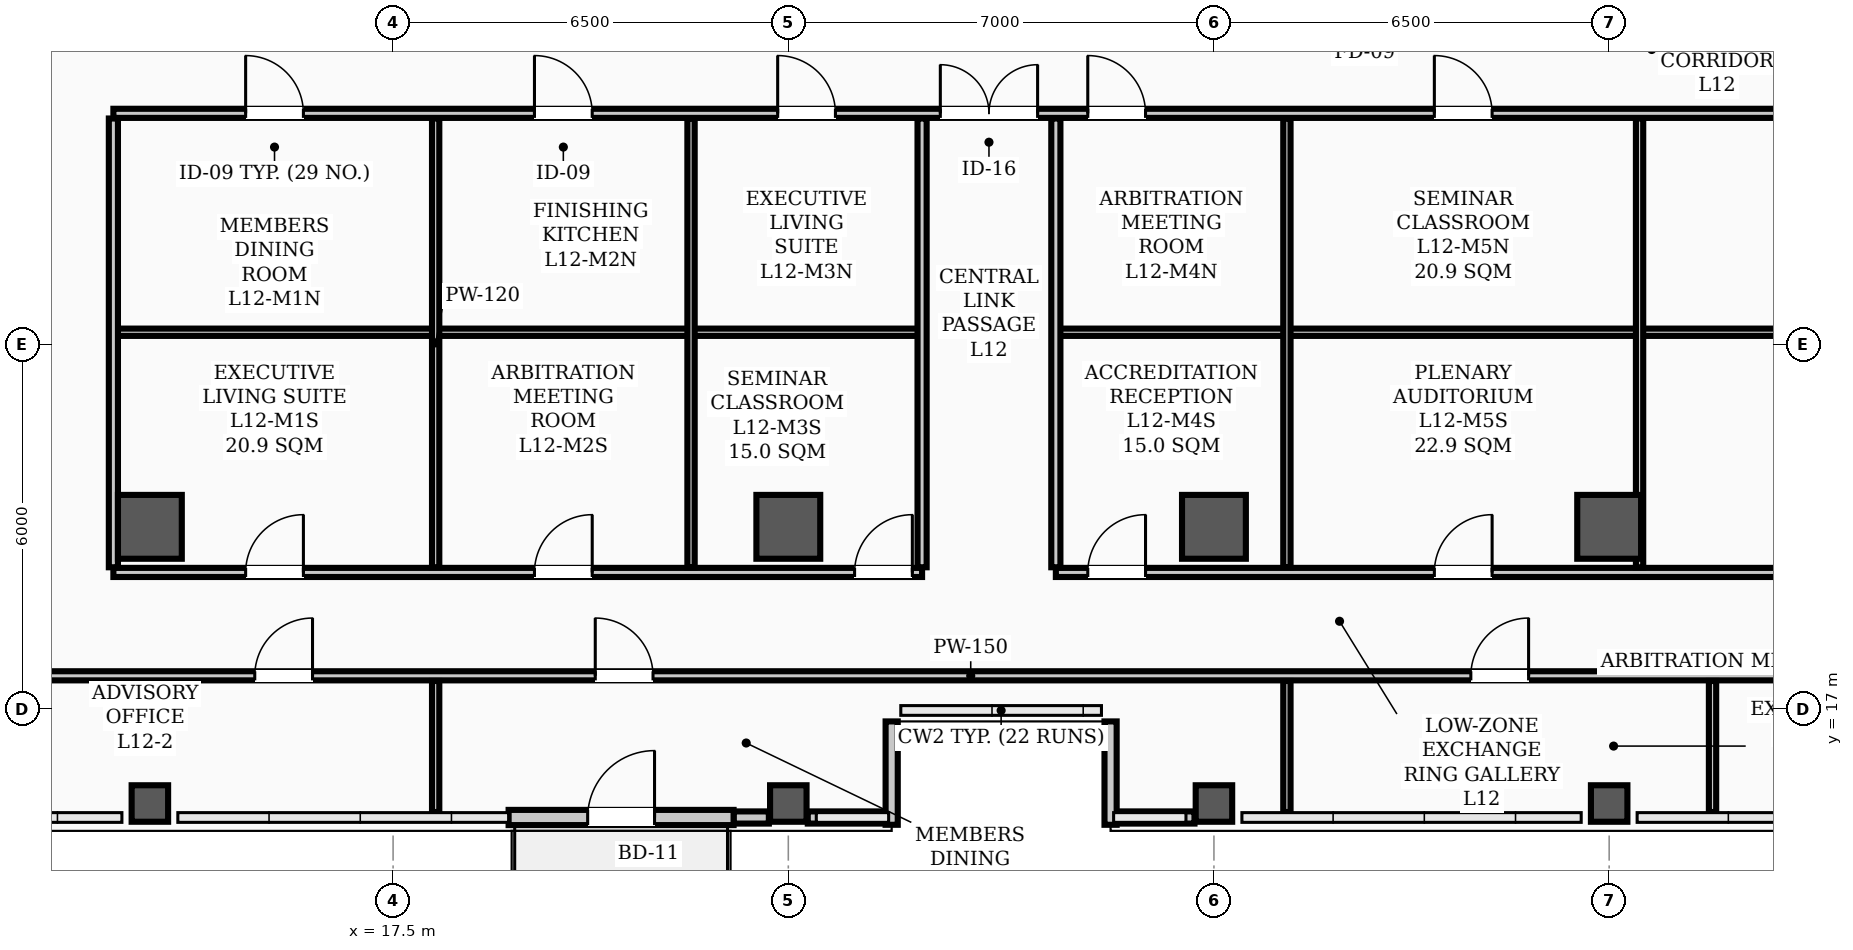
"""IFC4 building model, lengths in metres.
Left out: names, types, materials, properties, quantities, classifications, styles, units other than length and angle.
Written with IfcOpenShell. Run it as: python <this file> out.ifc"""

import sys

from ifc_helpers import new_model, si_unit, direction, frame, frame_2d, origin, origin_2d, place, context, subcontext, project, spatial, rectangle, hollow_rectangle, extrude, element, fill, save


model = new_model("IFC4")
c1 = context("Model", 3, precision=1e-05, world=origin(), true_north=direction((0.0, 1.0)))
c2 = subcontext(c1, "Body", "Model", "MODEL_VIEW")
j1 = project(units=[si_unit("LENGTHUNIT", "METRE"), si_unit("PLANEANGLEUNIT", "RADIAN")], contexts=[c1])
p1 = place(None, origin())
s1 = spatial("IfcSite", under=j1, at=p1, CompositionType="ELEMENT")
p2 = place(p1, origin())
s2 = spatial("IfcBuilding", under=s1, at=p2, CompositionType="ELEMENT")
p3 = place(p2, frame((0.0, 0.0, 49.9)))
s3 = spatial("IfcBuildingStorey", under=s2, at=p3, CompositionType="ELEMENT", Elevation=49.9)
for number, where, z_axis, x_axis in (
    (1, (13.5, 20.0, 0.0), (0.0, 0.0, 1.0), (1.0, 0.0, 0.0)),
    (2, (24.0, 20.0, 0.0), (0.0, 0.0, 1.0), (1.0, 0.0, 0.0)),
    (3, (31.0, 20.0, 0.0), (0.0, 0.0, 1.0), (1.0, 0.0, 0.0)),
    (4, (37.5, 20.0, 0.0), (0.0, 0.0, 1.0), (1.0, 0.0, 0.0)),
):
    element("IfcColumn", number, at=place(p3, frame(where, z_axis=z_axis, x_axis=x_axis)), inside=s3, PredefinedType="COLUMN", context=c2, shape_type="SweptSolid", body=[
        extrude(hollow_rectangle(XDim=1.05, YDim=1.05, WallThickness=0.038, InnerFilletRadius=0.019, OuterFilletRadius=0.057, at=origin_2d()), origin(), (0.0, 0.0, 1.0), 3.9),
    ])
for number, where, z_axis, x_axis in (
    (5, (13.5, 15.45, 0.0), (0.0, 0.0, 1.0), (1.0, 0.0, 0.0)),
    (6, (24.0, 15.45, 0.0), (0.0, 0.0, 1.0), (1.0, 0.0, 0.0)),
    (7, (31.0, 15.45, 0.0), (0.0, 0.0, 1.0), (1.0, 0.0, 0.0)),
    (8, (37.5, 15.45, 0.0), (0.0, 0.0, 1.0), (1.0, 0.0, 0.0)),
):
    element("IfcColumn", number, at=place(p3, frame(where, z_axis=z_axis, x_axis=x_axis)), inside=s3, PredefinedType="COLUMN", context=c2, shape_type="SweptSolid", body=[
        extrude(hollow_rectangle(XDim=0.6, YDim=0.6, WallThickness=0.026, InnerFilletRadius=0.013, OuterFilletRadius=0.039, at=origin_2d()), origin(), (0.0, 0.0, 1.0), 3.9),
    ])
p4 = place(p3, frame((23.1, 15.22, 0.0), z_axis=(0.0, 0.0, 1.0), x_axis=(1.0, 0.0, 0.0)))
e9 = element("IfcWall", 9, at=p4, inside=s3, PredefinedType="PARAPET", context=c2, shape_type="SweptSolid", body=[
    extrude(rectangle(XDim=0.58, YDim=0.2, at=frame_2d((0.29, 0.0))), origin(), (0.0, 0.0, 1.0), 1.2),
])
for number, where, z_axis, x_axis in (
    (10, (24.32, 15.22, 0.0), (0.0, 0.0, 1.0), (1.0, 0.0, 0.0)),
    (11, (29.35, 15.22, 0.0), (0.0, 0.0, 1.0), (1.0, 0.0, 0.0)),
):
    element("IfcWall", number, at=place(p3, frame(where, z_axis=z_axis, x_axis=x_axis)), inside=s3, PredefinedType="PARAPET", context=c2, shape_type="SweptSolid", body=[
        extrude(rectangle(XDim=1.33, YDim=0.2, at=frame_2d((0.665, 0.0))), origin(), (0.0, 0.0, 1.0), 1.2),
    ])
for number, where, z_axis, x_axis in (
    (12, (25.7, 15.1, 0.0), (0.0, 0.0, 1.0), (0.0, 1.0, 0.0)),
    (13, (29.3, 16.8, 0.0), (0.0, 0.0, 1.0), (0.0, -1.0, 0.0)),
):
    element("IfcWall", number, at=place(p3, frame(where, z_axis=z_axis, x_axis=x_axis)), inside=s3, PredefinedType="PARAPET", context=c2, shape_type="SweptSolid", body=[
        extrude(rectangle(XDim=1.7, YDim=0.2, at=frame_2d((0.85, 0.0))), origin(), (0.0, 0.0, 1.0), 1.2),
    ])
p5 = place(p3, frame((19.4, 15.22, 0.0), z_axis=(0.0, 0.0, 1.0), x_axis=(1.0, 0.0, 0.0)))
e14 = element("IfcWall", 14, at=p5, inside=s3, PredefinedType="STANDARD", context=c2, shape_type="SweptSolid", body=[
    extrude(rectangle(XDim=3.7, YDim=0.25, at=frame_2d((1.85, 0.0))), origin(), (0.0, 0.0, 1.0), 2.22),
])
p6 = place(p5, frame((1.3, 0.0, 0.0)))
e15 = element("IfcOpeningElement", 15, at=p6, cuts=e14, PredefinedType="OPENING", context=c2, shape_type="SweptSolid", body=[
    extrude(rectangle(XDim=1.1, YDim=2.2, at=frame_2d((0.55, 1.1))), frame((0.0, 0.135, 0.0), z_axis=(0.0, -1.0, 0.0), x_axis=(1.0, 0.0, 0.0)), (0.0, 0.0, 1.0), 0.27),
])
p7 = place(p3, frame((12.9, 26.8, 0.0), z_axis=(0.0, 0.0, 1.0), x_axis=(1.0, 0.0, 0.0)))
e16 = element("IfcWall", 16, at=p7, inside=s3, PredefinedType="PARTITIONING", context=c2, shape_type="SweptSolid", body=[
    extrude(rectangle(XDim=31.7, YDim=0.15, at=frame_2d((15.85, 0.0))), origin(), (0.0, 0.0, 1.0), 2.24),
])
p8 = place(p7, frame((13.6, 0.0, 0.0)))
e17 = element("IfcOpeningElement", 17, at=p8, cuts=e16, PredefinedType="OPENING", context=c2, shape_type="SweptSolid", body=[
    extrude(rectangle(XDim=1.6, YDim=2.08, at=frame_2d((0.8, 1.04))), frame((0.0, 0.085, 0.0), z_axis=(0.0, -1.0, 0.0), x_axis=(1.0, 0.0, 0.0)), (0.0, 0.0, 1.0), 0.17),
])
p9 = place(p7, frame((2.175, 0.0, 0.0)))
e18 = element("IfcOpeningElement", 18, at=p9, cuts=e16, PredefinedType="OPENING", context=c2, shape_type="SweptSolid", body=[
    extrude(rectangle(XDim=0.95, YDim=2.08, at=frame_2d((0.475, 1.04))), frame((0.0, 0.085, 0.0), z_axis=(0.0, -1.0, 0.0), x_axis=(1.0, 0.0, 0.0)), (0.0, 0.0, 1.0), 0.17),
])
p10 = place(p7, frame((6.925, 0.0, 0.0)))
e19 = element("IfcOpeningElement", 19, at=p10, cuts=e16, PredefinedType="OPENING", context=c2, shape_type="SweptSolid", body=[
    extrude(rectangle(XDim=0.95, YDim=2.08, at=frame_2d((0.475, 1.04))), frame((0.0, 0.085, 0.0), z_axis=(0.0, -1.0, 0.0), x_axis=(1.0, 0.0, 0.0)), (0.0, 0.0, 1.0), 0.17),
])
p11 = place(p7, frame((10.925, 0.0, 0.0)))
e20 = element("IfcOpeningElement", 20, at=p11, cuts=e16, PredefinedType="OPENING", context=c2, shape_type="SweptSolid", body=[
    extrude(rectangle(XDim=0.95, YDim=2.08, at=frame_2d((0.475, 1.04))), frame((0.0, 0.085, 0.0), z_axis=(0.0, -1.0, 0.0), x_axis=(1.0, 0.0, 0.0)), (0.0, 0.0, 1.0), 0.17),
])
p12 = place(p7, frame((16.025, 0.0, 0.0)))
e21 = element("IfcOpeningElement", 21, at=p12, cuts=e16, PredefinedType="OPENING", context=c2, shape_type="SweptSolid", body=[
    extrude(rectangle(XDim=0.95, YDim=2.08, at=frame_2d((0.475, 1.04))), frame((0.0, 0.085, 0.0), z_axis=(0.0, -1.0, 0.0), x_axis=(1.0, 0.0, 0.0)), (0.0, 0.0, 1.0), 0.17),
])
p13 = place(p7, frame((21.725, 0.0, 0.0)))
e22 = element("IfcOpeningElement", 22, at=p13, cuts=e16, PredefinedType="OPENING", context=c2, shape_type="SweptSolid", body=[
    extrude(rectangle(XDim=0.95, YDim=2.08, at=frame_2d((0.475, 1.04))), frame((0.0, 0.085, 0.0), z_axis=(0.0, -1.0, 0.0), x_axis=(1.0, 0.0, 0.0)), (0.0, 0.0, 1.0), 0.17),
])
p14 = place(p7, frame((27.925, 0.0, 0.0)))
e23 = element("IfcOpeningElement", 23, at=p14, cuts=e16, PredefinedType="OPENING", context=c2, shape_type="SweptSolid", body=[
    extrude(rectangle(XDim=0.95, YDim=2.08, at=frame_2d((0.475, 1.04))), frame((0.0, 0.085, 0.0), z_axis=(0.0, -1.0, 0.0), x_axis=(1.0, 0.0, 0.0)), (0.0, 0.0, 1.0), 0.17),
])
p15 = place(p3, frame((4.66, 17.55, 0.0), z_axis=(0.0, 0.0, 1.0), x_axis=(1.0, 0.0, 0.0)))
e24 = element("IfcWall", 24, at=p15, inside=s3, PredefinedType="PARTITIONING", context=c2, shape_type="SweptSolid", body=[
    extrude(rectangle(XDim=44.68, YDim=0.15, at=frame_2d((22.34, 0.0))), origin(), (0.0, 0.0, 1.0), 2.24),
])
p16 = place(p15, frame((10.565, 0.0, 0.0)))
e25 = element("IfcOpeningElement", 25, at=p16, cuts=e24, PredefinedType="OPENING", context=c2, shape_type="SweptSolid", body=[
    extrude(rectangle(XDim=0.95, YDim=2.08, at=frame_2d((0.475, 1.04))), frame((0.0, 0.085, 0.0), z_axis=(0.0, -1.0, 0.0), x_axis=(1.0, 0.0, 0.0)), (0.0, 0.0, 1.0), 0.17),
])
p17 = place(p15, frame((16.165, 0.0, 0.0)))
e26 = element("IfcOpeningElement", 26, at=p17, cuts=e24, PredefinedType="OPENING", context=c2, shape_type="SweptSolid", body=[
    extrude(rectangle(XDim=0.95, YDim=2.08, at=frame_2d((0.475, 1.04))), frame((0.0, 0.085, 0.0), z_axis=(0.0, -1.0, 0.0), x_axis=(1.0, 0.0, 0.0)), (0.0, 0.0, 1.0), 0.17),
])
p18 = place(p15, frame((30.565, 0.0, 0.0)))
e27 = element("IfcOpeningElement", 27, at=p18, cuts=e24, PredefinedType="OPENING", context=c2, shape_type="SweptSolid", body=[
    extrude(rectangle(XDim=0.95, YDim=2.08, at=frame_2d((0.475, 1.04))), frame((0.0, 0.085, 0.0), z_axis=(0.0, -1.0, 0.0), x_axis=(1.0, 0.0, 0.0)), (0.0, 0.0, 1.0), 0.17),
])
p19 = place(p15, frame((37.365, 0.0, 0.0)))
e28 = element("IfcOpeningElement", 28, at=p19, cuts=e24, PredefinedType="OPENING", context=c2, shape_type="SweptSolid", body=[
    extrude(rectangle(XDim=0.95, YDim=2.08, at=frame_2d((0.475, 1.04))), frame((0.0, 0.085, 0.0), z_axis=(0.0, -1.0, 0.0), x_axis=(1.0, 0.0, 0.0)), (0.0, 0.0, 1.0), 0.17),
])
p20 = place(p3, frame((12.9, 19.25, 0.0), z_axis=(0.0, 0.0, 1.0), x_axis=(1.0, 0.0, 0.0)))
e29 = element("IfcWall", 29, at=p20, inside=s3, PredefinedType="PARTITIONING", context=c2, shape_type="SweptSolid", body=[
    extrude(rectangle(XDim=13.3, YDim=0.15, at=frame_2d((6.65, 0.0))), origin(), (0.0, 0.0, 1.0), 2.24),
])
p21 = place(p20, frame((2.175, 0.0, 0.0)))
e30 = element("IfcOpeningElement", 30, at=p21, cuts=e29, PredefinedType="OPENING", context=c2, shape_type="SweptSolid", body=[
    extrude(rectangle(XDim=0.95, YDim=2.08, at=frame_2d((0.475, 1.04))), frame((0.0, 0.085, 0.0), z_axis=(0.0, -1.0, 0.0), x_axis=(1.0, 0.0, 0.0)), (0.0, 0.0, 1.0), 0.17),
])
p22 = place(p20, frame((6.925, 0.0, 0.0)))
e31 = element("IfcOpeningElement", 31, at=p22, cuts=e29, PredefinedType="OPENING", context=c2, shape_type="SweptSolid", body=[
    extrude(rectangle(XDim=0.95, YDim=2.08, at=frame_2d((0.475, 1.04))), frame((0.0, 0.085, 0.0), z_axis=(0.0, -1.0, 0.0), x_axis=(1.0, 0.0, 0.0)), (0.0, 0.0, 1.0), 0.17),
])
p23 = place(p20, frame((12.19, 0.0, 0.0)))
e32 = element("IfcOpeningElement", 32, at=p23, cuts=e29, PredefinedType="OPENING", context=c2, shape_type="SweptSolid", body=[
    extrude(rectangle(XDim=0.95, YDim=2.08, at=frame_2d((0.475, 1.04))), frame((0.0, 0.085, 0.0), z_axis=(0.0, -1.0, 0.0), x_axis=(1.0, 0.0, 0.0)), (0.0, 0.0, 1.0), 0.17),
])
p24 = place(p3, frame((28.4, 19.25, 0.0), z_axis=(0.0, 0.0, 1.0), x_axis=(1.0, 0.0, 0.0)))
e33 = element("IfcWall", 33, at=p24, inside=s3, PredefinedType="PARTITIONING", context=c2, shape_type="SweptSolid", body=[
    extrude(rectangle(XDim=16.2, YDim=0.15, at=frame_2d((8.1, 0.0))), origin(), (0.0, 0.0, 1.0), 2.24),
])
p25 = place(p24, frame((0.525, 0.0, 0.0)))
e34 = element("IfcOpeningElement", 34, at=p25, cuts=e33, PredefinedType="OPENING", context=c2, shape_type="SweptSolid", body=[
    extrude(rectangle(XDim=0.95, YDim=2.08, at=frame_2d((0.475, 1.04))), frame((0.0, 0.085, 0.0), z_axis=(0.0, -1.0, 0.0), x_axis=(1.0, 0.0, 0.0)), (0.0, 0.0, 1.0), 0.17),
])
p26 = place(p24, frame((6.225, 0.0, 0.0)))
e35 = element("IfcOpeningElement", 35, at=p26, cuts=e33, PredefinedType="OPENING", context=c2, shape_type="SweptSolid", body=[
    extrude(rectangle(XDim=0.95, YDim=2.08, at=frame_2d((0.475, 1.04))), frame((0.0, 0.085, 0.0), z_axis=(0.0, -1.0, 0.0), x_axis=(1.0, 0.0, 0.0)), (0.0, 0.0, 1.0), 0.17),
])
p27 = place(p24, frame((12.425, 0.0, 0.0)))
e36 = element("IfcOpeningElement", 36, at=p27, cuts=e33, PredefinedType="OPENING", context=c2, shape_type="SweptSolid", body=[
    extrude(rectangle(XDim=0.95, YDim=2.08, at=frame_2d((0.475, 1.04))), frame((0.0, 0.085, 0.0), z_axis=(0.0, -1.0, 0.0), x_axis=(1.0, 0.0, 0.0)), (0.0, 0.0, 1.0), 0.17),
])
p28 = place(p3, frame((12.9, 23.2, 0.0), z_axis=(0.0, 0.0, 1.0), x_axis=(1.0, 0.0, 0.0)))
e37 = element("IfcWall", 37, at=p28, inside=s3, PredefinedType="PARTITIONING", context=c2, shape_type="SweptSolid", body=[
    extrude(rectangle(XDim=5.3, YDim=0.12, at=frame_2d((2.65, 0.0))), origin(), (0.0, 0.0, 1.0), 2.24),
])
p29 = place(p3, frame((18.2, 23.2, 0.0), z_axis=(0.0, 0.0, 1.0), x_axis=(1.0, 0.0, 0.0)))
e38 = element("IfcWall", 38, at=p29, inside=s3, PredefinedType="PARTITIONING", context=c2, shape_type="SweptSolid", body=[
    extrude(rectangle(XDim=4.2, YDim=0.12, at=frame_2d((2.1, 0.0))), origin(), (0.0, 0.0, 1.0), 3.24),
])
for number, where, z_axis, x_axis in (
    (39, (22.4, 23.2, 0.0), (0.0, 0.0, 1.0), (1.0, 0.0, 0.0)),
    (40, (28.4, 23.2, 0.0), (0.0, 0.0, 1.0), (1.0, 0.0, 0.0)),
):
    element("IfcWall", number, at=place(p3, frame(where, z_axis=z_axis, x_axis=x_axis)), inside=s3, PredefinedType="PARTITIONING", context=c2, shape_type="SweptSolid", body=[
        extrude(rectangle(XDim=3.8, YDim=0.12, at=frame_2d((1.9, 0.0))), origin(), (0.0, 0.0, 1.0), 2.24),
    ])
p30 = place(p3, frame((32.2, 23.2, 0.0), z_axis=(0.0, 0.0, 1.0), x_axis=(1.0, 0.0, 0.0)))
e41 = element("IfcWall", 41, at=p30, inside=s3, PredefinedType="PARTITIONING", context=c2, shape_type="SweptSolid", body=[
    extrude(rectangle(XDim=5.8, YDim=0.12, at=frame_2d((2.9, 0.0))), origin(), (0.0, 0.0, 1.0), 2.24),
])
p31 = place(p3, frame((38.0, 23.2, 0.0), z_axis=(0.0, 0.0, 1.0), x_axis=(1.0, 0.0, 0.0)))
e42 = element("IfcWall", 42, at=p31, inside=s3, PredefinedType="PARTITIONING", context=c2, shape_type="SweptSolid", body=[
    extrude(rectangle(XDim=6.6, YDim=0.12, at=frame_2d((3.3, 0.0))), origin(), (0.0, 0.0, 1.0), 2.24),
])
for number, where, z_axis, x_axis in (
    (43, (26.2, 19.335, 0.0), (0.0, 0.0, 1.0), (0.0, 1.0, 0.0)),
    (44, (28.4, 19.335, 0.0), (0.0, 0.0, 1.0), (0.0, 1.0, 0.0)),
    (45, (12.9, 19.335, 0.0), (0.0, 0.0, 1.0), (0.0, 1.0, 0.0)),
):
    element("IfcWall", number, at=place(p3, frame(where, z_axis=z_axis, x_axis=x_axis)), inside=s3, PredefinedType="PARTITIONING", context=c2, shape_type="SweptSolid", body=[
        extrude(rectangle(XDim=7.38, YDim=0.15, at=frame_2d((3.69, 0.0))), origin(), (0.0, 0.0, 1.0), 2.24),
    ])
for number, where, z_axis, x_axis in (
    (46, (18.2, 15.31, 0.0), (0.0, 0.0, 1.0), (0.0, 1.0, 0.0)),
    (47, (32.2, 15.31, 0.0), (0.0, 0.0, 1.0), (0.0, 1.0, 0.0)),
    (48, (39.2, 15.31, 0.0), (0.0, 0.0, 1.0), (0.0, 1.0, 0.0)),
):
    element("IfcWall", number, at=place(p3, frame(where, z_axis=z_axis, x_axis=x_axis)), inside=s3, PredefinedType="PARTITIONING", context=c2, shape_type="SweptSolid", body=[
        extrude(rectangle(XDim=2.155, YDim=0.12, at=frame_2d((1.078, 0.0))), origin(), (0.0, 0.0, 1.0), 2.24),
    ])
for number, where, z_axis, x_axis in (
    (49, (18.2, 19.335, 0.0), (0.0, 0.0, 1.0), (0.0, 1.0, 0.0)),
    (50, (22.4, 19.335, 0.0), (0.0, 0.0, 1.0), (0.0, 1.0, 0.0)),
    (51, (32.2, 19.335, 0.0), (0.0, 0.0, 1.0), (0.0, 1.0, 0.0)),
    (52, (38.0, 19.335, 0.0), (0.0, 0.0, 1.0), (0.0, 1.0, 0.0)),
):
    element("IfcWall", number, at=place(p3, frame(where, z_axis=z_axis, x_axis=x_axis)), inside=s3, PredefinedType="PARTITIONING", context=c2, shape_type="SweptSolid", body=[
        extrude(rectangle(XDim=7.38, YDim=0.12, at=frame_2d((3.69, 0.0))), origin(), (0.0, 0.0, 1.0), 2.24),
    ])
p32 = place(p6, origin())
e53 = element("IfcDoor", 53, at=p32, inside=s3, OperationType="SINGLE_SWING_RIGHT", PredefinedType="DOOR", context=c2, shape_type="SweptSolid", body=[
    extrude(rectangle(XDim=1.1, YDim=2.2, at=frame_2d((0.55, 1.1))), frame((0.0, 0.025, 0.0), z_axis=(0.0, -1.0, 0.0), x_axis=(1.0, 0.0, 0.0)), (0.0, 0.0, 1.0), 0.05),
])
fill(e15, e53)
p33 = place(p8, origin())
e54 = element("IfcDoor", 54, at=p33, inside=s3, OperationType="DOUBLE_DOOR_SINGLE_SWING", PredefinedType="DOOR", context=c2, shape_type="SweptSolid", body=[
    extrude(rectangle(XDim=1.6, YDim=2.08, at=frame_2d((0.8, 1.04))), frame((0.0, 0.025, 0.0), z_axis=(0.0, -1.0, 0.0), x_axis=(1.0, 0.0, 0.0)), (0.0, 0.0, 1.0), 0.05),
])
fill(e17, e54)
p34 = place(p16, origin())
e55 = element("IfcDoor", 55, at=p34, inside=s3, OperationType="SINGLE_SWING_RIGHT", PredefinedType="DOOR", context=c2, shape_type="SweptSolid", body=[
    extrude(rectangle(XDim=0.95, YDim=2.08, at=frame_2d((0.475, 1.04))), frame((0.0, 0.025, 0.0), z_axis=(0.0, -1.0, 0.0), x_axis=(1.0, 0.0, 0.0)), (0.0, 0.0, 1.0), 0.05),
])
fill(e25, e55)
p35 = place(p17, origin())
e56 = element("IfcDoor", 56, at=p35, inside=s3, OperationType="SINGLE_SWING_LEFT", PredefinedType="DOOR", context=c2, shape_type="SweptSolid", body=[
    extrude(rectangle(XDim=0.95, YDim=2.08, at=frame_2d((0.475, 1.04))), frame((0.0, 0.025, 0.0), z_axis=(0.0, -1.0, 0.0), x_axis=(1.0, 0.0, 0.0)), (0.0, 0.0, 1.0), 0.05),
])
fill(e26, e56)
p36 = place(p18, origin())
e57 = element("IfcDoor", 57, at=p36, inside=s3, OperationType="SINGLE_SWING_RIGHT", PredefinedType="DOOR", context=c2, shape_type="SweptSolid", body=[
    extrude(rectangle(XDim=0.95, YDim=2.08, at=frame_2d((0.475, 1.04))), frame((0.0, 0.025, 0.0), z_axis=(0.0, -1.0, 0.0), x_axis=(1.0, 0.0, 0.0)), (0.0, 0.0, 1.0), 0.05),
])
fill(e27, e57)
p37 = place(p9, origin())
e58 = element("IfcDoor", 58, at=p37, inside=s3, OperationType="SINGLE_SWING_LEFT", PredefinedType="DOOR", context=c2, shape_type="SweptSolid", body=[
    extrude(rectangle(XDim=0.95, YDim=2.08, at=frame_2d((0.475, 1.04))), frame((0.0, 0.025, 0.0), z_axis=(0.0, -1.0, 0.0), x_axis=(1.0, 0.0, 0.0)), (0.0, 0.0, 1.0), 0.05),
])
fill(e18, e58)
p38 = place(p21, origin())
e59 = element("IfcDoor", 59, at=p38, inside=s3, OperationType="SINGLE_SWING_RIGHT", PredefinedType="DOOR", context=c2, shape_type="SweptSolid", body=[
    extrude(rectangle(XDim=0.95, YDim=2.08, at=frame_2d((0.475, 1.04))), frame((0.0, 0.025, 0.0), z_axis=(0.0, -1.0, 0.0), x_axis=(1.0, 0.0, 0.0)), (0.0, 0.0, 1.0), 0.05),
])
fill(e30, e59)
p39 = place(p10, origin())
e60 = element("IfcDoor", 60, at=p39, inside=s3, OperationType="SINGLE_SWING_LEFT", PredefinedType="DOOR", context=c2, shape_type="SweptSolid", body=[
    extrude(rectangle(XDim=0.95, YDim=2.08, at=frame_2d((0.475, 1.04))), frame((0.0, 0.025, 0.0), z_axis=(0.0, -1.0, 0.0), x_axis=(1.0, 0.0, 0.0)), (0.0, 0.0, 1.0), 0.05),
])
fill(e19, e60)
p40 = place(p22, origin())
e61 = element("IfcDoor", 61, at=p40, inside=s3, OperationType="SINGLE_SWING_RIGHT", PredefinedType="DOOR", context=c2, shape_type="SweptSolid", body=[
    extrude(rectangle(XDim=0.95, YDim=2.08, at=frame_2d((0.475, 1.04))), frame((0.0, 0.025, 0.0), z_axis=(0.0, -1.0, 0.0), x_axis=(1.0, 0.0, 0.0)), (0.0, 0.0, 1.0), 0.05),
])
fill(e31, e61)
p41 = place(p11, origin())
e62 = element("IfcDoor", 62, at=p41, inside=s3, OperationType="SINGLE_SWING_LEFT", PredefinedType="DOOR", context=c2, shape_type="SweptSolid", body=[
    extrude(rectangle(XDim=0.95, YDim=2.08, at=frame_2d((0.475, 1.04))), frame((0.0, 0.025, 0.0), z_axis=(0.0, -1.0, 0.0), x_axis=(1.0, 0.0, 0.0)), (0.0, 0.0, 1.0), 0.05),
])
fill(e20, e62)
p42 = place(p23, origin())
e63 = element("IfcDoor", 63, at=p42, inside=s3, OperationType="SINGLE_SWING_RIGHT", PredefinedType="DOOR", context=c2, shape_type="SweptSolid", body=[
    extrude(rectangle(XDim=0.95, YDim=2.08, at=frame_2d((0.475, 1.04))), frame((0.0, 0.025, 0.0), z_axis=(0.0, -1.0, 0.0), x_axis=(1.0, 0.0, 0.0)), (0.0, 0.0, 1.0), 0.05),
])
fill(e32, e63)
p43 = place(p12, origin())
e64 = element("IfcDoor", 64, at=p43, inside=s3, OperationType="SINGLE_SWING_LEFT", PredefinedType="DOOR", context=c2, shape_type="SweptSolid", body=[
    extrude(rectangle(XDim=0.95, YDim=2.08, at=frame_2d((0.475, 1.04))), frame((0.0, 0.025, 0.0), z_axis=(0.0, -1.0, 0.0), x_axis=(1.0, 0.0, 0.0)), (0.0, 0.0, 1.0), 0.05),
])
fill(e21, e64)
p44 = place(p25, origin())
e65 = element("IfcDoor", 65, at=p44, inside=s3, OperationType="SINGLE_SWING_RIGHT", PredefinedType="DOOR", context=c2, shape_type="SweptSolid", body=[
    extrude(rectangle(XDim=0.95, YDim=2.08, at=frame_2d((0.475, 1.04))), frame((0.0, 0.025, 0.0), z_axis=(0.0, -1.0, 0.0), x_axis=(1.0, 0.0, 0.0)), (0.0, 0.0, 1.0), 0.05),
])
fill(e34, e65)
p45 = place(p13, origin())
e66 = element("IfcDoor", 66, at=p45, inside=s3, OperationType="SINGLE_SWING_LEFT", PredefinedType="DOOR", context=c2, shape_type="SweptSolid", body=[
    extrude(rectangle(XDim=0.95, YDim=2.08, at=frame_2d((0.475, 1.04))), frame((0.0, 0.025, 0.0), z_axis=(0.0, -1.0, 0.0), x_axis=(1.0, 0.0, 0.0)), (0.0, 0.0, 1.0), 0.05),
])
fill(e22, e66)
p46 = place(p26, origin())
e67 = element("IfcDoor", 67, at=p46, inside=s3, OperationType="SINGLE_SWING_RIGHT", PredefinedType="DOOR", context=c2, shape_type="SweptSolid", body=[
    extrude(rectangle(XDim=0.95, YDim=2.08, at=frame_2d((0.475, 1.04))), frame((0.0, 0.025, 0.0), z_axis=(0.0, -1.0, 0.0), x_axis=(1.0, 0.0, 0.0)), (0.0, 0.0, 1.0), 0.05),
])
fill(e35, e67)
save(model, sys.argv[1])
